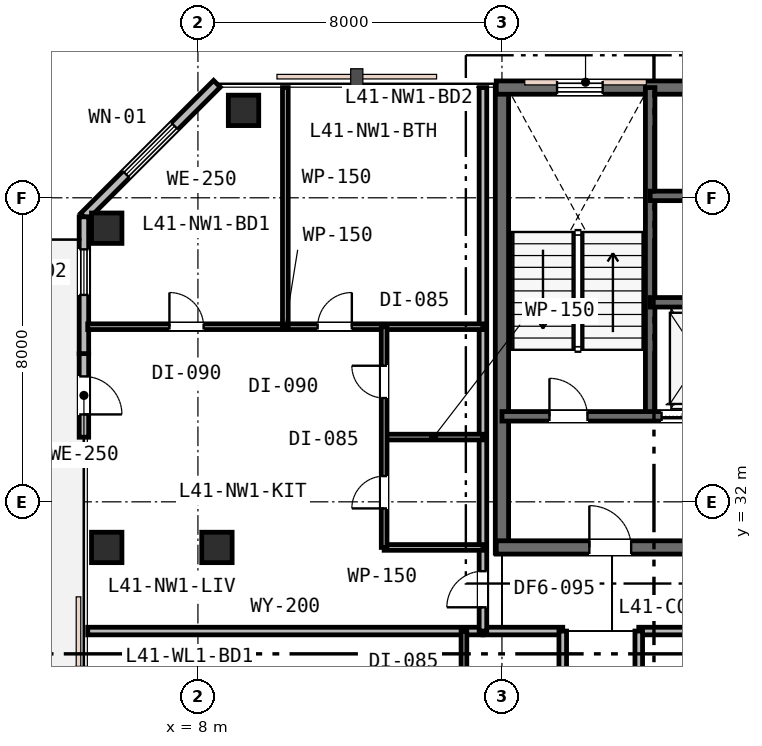
"""IFC4 building model, lengths in metres.
Left out: names, types, materials, properties, quantities, classifications, styles, units other than length and angle.
Written with IfcOpenShell. Run it as: python <this file> out.ifc"""

import sys

from ifc_helpers import new_model, si_unit, direction, frame, frame_2d, origin, origin_2d, place, context, subcontext, project, spatial, rectangle, extrude, element, fill, save


model = new_model("IFC4")
c1 = context("Model", 3, precision=1e-05, world=origin(), true_north=direction((0.0, 1.0)))
c2 = subcontext(c1, "Body", "Model", "MODEL_VIEW")
j1 = project(units=[si_unit("LENGTHUNIT", "METRE"), si_unit("PLANEANGLEUNIT", "RADIAN")], contexts=[c1])
p1 = place(None, origin())
s1 = spatial("IfcSite", under=j1, at=p1, CompositionType="ELEMENT")
p2 = place(p1, origin())
s2 = spatial("IfcBuilding", under=s1, at=p2, CompositionType="ELEMENT")
p3 = place(p2, frame((0.0, 0.0, 161.4)))
s3 = spatial("IfcBuildingStorey", under=s2, at=p3, CompositionType="ELEMENT", Elevation=161.4)
p4 = place(p3, frame((16.0, 30.65, 0.0), z_axis=(0.0, 0.0, 1.0), x_axis=(0.0, 1.0, 0.0)))
e1 = element("IfcWall", 1, at=p4, inside=s3, PredefinedType="SHEAR", context=c2, shape_type="SweptSolid", body=[
    extrude(rectangle(XDim=12.3, YDim=0.35, at=frame_2d((6.15, 0.0))), origin(), (0.0, 0.0, 1.0), 3.6),
])
p5 = place(p3, frame((15.85, 42.9, 0.0), z_axis=(0.0, 0.0, 1.0), x_axis=(1.0, 0.0, 0.0)))
e2 = element("IfcWall", 2, at=p5, inside=s3, PredefinedType="SHEAR", context=c2, shape_type="SweptSolid", body=[
    extrude(rectangle(XDim=24.3, YDim=0.35, at=frame_2d((12.15, 0.0))), origin(), (0.0, 0.0, 1.0), 3.6),
])
p6 = place(p5, frame((1.6, 0.0, 0.95)))
e3 = element("IfcOpeningElement", 3, at=p6, cuts=e2, PredefinedType="OPENING", context=c2, shape_type="SweptSolid", body=[
    extrude(rectangle(XDim=1.2, YDim=1.6, at=frame_2d((0.6, 0.8))), frame((0.0, 0.185, 0.0), z_axis=(0.0, -1.0, 0.0), x_axis=(1.0, 0.0, 0.0)), (0.0, 0.0, 1.0), 0.37),
])
p7 = place(p5, frame((16.5, 0.0, 0.95)))
e4 = element("IfcOpeningElement", 4, at=p7, cuts=e2, PredefinedType="OPENING", context=c2, shape_type="SweptSolid", body=[
    extrude(rectangle(XDim=1.2, YDim=1.6, at=frame_2d((0.6, 0.8))), frame((0.0, 0.185, 0.0), z_axis=(0.0, -1.0, 0.0), x_axis=(1.0, 0.0, 0.0)), (0.0, 0.0, 1.0), 0.37),
])
p8 = place(p5, frame((21.6, 0.0, 0.95)))
e5 = element("IfcOpeningElement", 5, at=p8, cuts=e2, PredefinedType="OPENING", context=c2, shape_type="SweptSolid", body=[
    extrude(rectangle(XDim=1.2, YDim=1.6, at=frame_2d((0.6, 0.8))), frame((0.0, 0.185, 0.0), z_axis=(0.0, -1.0, 0.0), x_axis=(1.0, 0.0, 0.0)), (0.0, 0.0, 1.0), 0.37),
])
p9 = place(p3, frame((15.85, 30.8, 0.0), z_axis=(0.0, 0.0, 1.0), x_axis=(1.0, 0.0, 0.0)))
e6 = element("IfcWall", 6, at=p9, inside=s3, PredefinedType="SHEAR", context=c2, shape_type="SweptSolid", body=[
    extrude(rectangle(XDim=11.2, YDim=0.35, at=frame_2d((5.6, 0.0))), origin(), (0.0, 0.0, 1.0), 3.6),
])
p10 = place(p9, frame((2.45, 0.0, 0.0)))
e7 = element("IfcOpeningElement", 7, at=p10, cuts=e6, PredefinedType="OPENING", context=c2, shape_type="SweptSolid", body=[
    extrude(rectangle(XDim=1.1, YDim=2.15, at=frame_2d((0.55, 1.075))), frame((0.0, 0.185, 0.0), z_axis=(0.0, -1.0, 0.0), x_axis=(1.0, 0.0, 0.0)), (0.0, 0.0, 1.0), 0.37),
])
p11 = place(p3, frame((19.9, 34.25, 0.0), z_axis=(0.0, 0.0, 1.0), x_axis=(0.0, 1.0, 0.0)))
e8 = element("IfcWall", 8, at=p11, inside=s3, PredefinedType="SHEAR", context=c2, shape_type="SweptSolid", body=[
    extrude(rectangle(XDim=8.65, YDim=0.25, at=frame_2d((4.325, 0.0))), origin(), (0.0, 0.0, 1.0), 3.6),
])
p12 = place(p3, frame((16.0, 34.25, 0.0), z_axis=(0.0, 0.0, 1.0), x_axis=(1.0, 0.0, 0.0)))
e9 = element("IfcWall", 9, at=p12, inside=s3, PredefinedType="SHEAR", context=c2, shape_type="SweptSolid", body=[
    extrude(rectangle(XDim=6.05, YDim=0.25, at=frame_2d((3.025, 0.0))), origin(), (0.0, 0.0, 1.0), 3.6),
])
p13 = place(p12, frame((1.25, 0.0, 0.0)))
e10 = element("IfcOpeningElement", 10, at=p13, cuts=e9, PredefinedType="OPENING", context=c2, shape_type="SweptSolid", body=[
    extrude(rectangle(XDim=1.0, YDim=2.15, at=frame_2d((0.5, 1.075))), frame((0.0, 0.135, 0.0), z_axis=(0.0, -1.0, 0.0), x_axis=(1.0, 0.0, 0.0)), (0.0, 0.0, 1.0), 0.27),
])
p14 = place(p12, frame((4.2, 0.0, 0.0)))
e11 = element("IfcOpeningElement", 11, at=p14, cuts=e9, PredefinedType="OPENING", context=c2, shape_type="SweptSolid", body=[
    extrude(rectangle(XDim=1.1, YDim=2.15, at=frame_2d((0.55, 1.075))), frame((0.0, 0.135, 0.0), z_axis=(0.0, -1.0, 0.0), x_axis=(1.0, 0.0, 0.0)), (0.0, 0.0, 1.0), 0.27),
])
p15 = place(p3, frame((19.9, 37.25, 0.0), z_axis=(0.0, 0.0, 1.0), x_axis=(1.0, 0.0, 0.0)))
e12 = element("IfcWall", 12, at=p15, inside=s3, PredefinedType="SHEAR", context=c2, shape_type="SweptSolid", body=[
    extrude(rectangle(XDim=16.2, YDim=0.25, at=frame_2d((8.1, 0.0))), origin(), (0.0, 0.0, 1.0), 3.6),
])
p16 = place(p15, frame((12.55, 0.0, 0.0)))
e13 = element("IfcOpeningElement", 13, at=p16, cuts=e12, PredefinedType="OPENING", context=c2, shape_type="SweptSolid", body=[
    extrude(rectangle(XDim=0.9, YDim=2.15, at=frame_2d((0.45, 1.075))), frame((0.0, 0.135, 0.0), z_axis=(0.0, -1.0, 0.0), x_axis=(1.0, 0.0, 0.0)), (0.0, 0.0, 1.0), 0.27),
])
p17 = place(p15, frame((2.5, 0.0, 0.0)))
e14 = element("IfcOpeningElement", 14, at=p17, cuts=e12, PredefinedType="OPENING", context=c2, shape_type="SweptSolid", body=[
    extrude(rectangle(XDim=1.05, YDim=2.15, at=frame_2d((0.525, 1.075))), frame((0.0, 0.135, 0.0), z_axis=(0.0, -1.0, 0.0), x_axis=(1.0, 0.0, 0.0)), (0.0, 0.0, 1.0), 0.27),
])
p18 = place(p15, frame((4.4, 0.0, 0.0)))
e15 = element("IfcOpeningElement", 15, at=p18, cuts=e12, PredefinedType="OPENING", context=c2, shape_type="SweptSolid", body=[
    extrude(rectangle(XDim=1.05, YDim=2.15, at=frame_2d((0.525, 1.075))), frame((0.0, 0.135, 0.0), z_axis=(0.0, -1.0, 0.0), x_axis=(1.0, 0.0, 0.0)), (0.0, 0.0, 1.0), 0.27),
])
p19 = place(p15, frame((6.3, 0.0, 0.0)))
e16 = element("IfcOpeningElement", 16, at=p19, cuts=e12, PredefinedType="OPENING", context=c2, shape_type="SweptSolid", body=[
    extrude(rectangle(XDim=1.05, YDim=2.15, at=frame_2d((0.525, 1.075))), frame((0.0, 0.135, 0.0), z_axis=(0.0, -1.0, 0.0), x_axis=(1.0, 0.0, 0.0)), (0.0, 0.0, 1.0), 0.27),
])
p20 = place(p3, frame((19.9, 40.05, 0.0), z_axis=(0.0, 0.0, 1.0), x_axis=(1.0, 0.0, 0.0)))
e17 = element("IfcWall", 17, at=p20, inside=s3, PredefinedType="SHEAR", context=c2, shape_type="SweptSolid", body=[
    extrude(rectangle(XDim=12.05, YDim=0.25, at=frame_2d((6.025, 0.0))), origin(), (0.0, 0.0, 1.0), 3.6),
])
for number, where, z_axis, x_axis in (
    (18, (5.6, 30.8, 0.0), (0.0, 0.0, 1.0), (1.0, 0.0, 0.0)),
    (19, (5.6, 39.2, 0.0), (0.0, 0.0, 1.0), (1.0, 0.0, 0.0)),
    (20, (8.5, 30.8, 0.0), (0.0, 0.0, 1.0), (1.0, 0.0, 0.0)),
    (21, (9.2, 42.3, 0.0), (0.0, 0.0, 1.0), (1.0, 0.0, 0.0)),
):
    element("IfcColumn", number, at=place(p3, frame(where, z_axis=z_axis, x_axis=x_axis)), inside=s3, PredefinedType="COLUMN", context=c2, shape_type="SweptSolid", body=[
        extrude(rectangle(XDim=0.8, YDim=0.8, at=origin_2d()), origin(), (0.0, 0.0, 1.0), 3.6),
    ])
p21 = place(p3, frame((8.5, 43.0, 0.0), z_axis=(0.0, 0.0, 1.0), x_axis=(-0.707106781187, -0.707106781187, 0.0)))
e22 = element("IfcWall", 22, at=p21, inside=s3, PredefinedType="STANDARD", context=c2, shape_type="SweptSolid", body=[
    extrude(rectangle(XDim=4.95, YDim=0.25, at=frame_2d((2.475, 0.0))), origin(), (0.0, 0.0, 1.0), 3.33),
])
p22 = place(p21, frame((1.575, 0.0, 0.75)))
e23 = element("IfcOpeningElement", 23, at=p22, cuts=e22, PredefinedType="OPENING", context=c2, shape_type="SweptSolid", body=[
    extrude(rectangle(XDim=1.8, YDim=1.85, at=frame_2d((0.9, 0.925))), frame((0.0, 0.135, 0.0), z_axis=(0.0, -1.0, 0.0), x_axis=(1.0, 0.0, 0.0)), (0.0, 0.0, 1.0), 0.27),
])
p23 = place(p3, frame((5.0, 35.9, 0.0), z_axis=(0.0, 0.0, 1.0), x_axis=(0.0, -1.0, 0.0)))
e24 = element("IfcWall", 24, at=p23, inside=s3, PredefinedType="STANDARD", context=c2, shape_type="SweptSolid", body=[
    extrude(rectangle(XDim=2.2, YDim=0.25, at=frame_2d((1.1, 0.0))), origin(), (0.0, 0.0, 1.0), 3.33),
])
p24 = place(p23, frame((0.6, 0.0, 0.0)))
e25 = element("IfcOpeningElement", 25, at=p24, cuts=e24, PredefinedType="OPENING", context=c2, shape_type="SweptSolid", body=[
    extrude(rectangle(XDim=1.0, YDim=2.15, at=frame_2d((0.5, 1.075))), frame((0.0, 0.135, 0.0), z_axis=(0.0, -1.0, 0.0), x_axis=(1.0, 0.0, 0.0)), (0.0, 0.0, 1.0), 0.27),
])
p25 = place(p3, frame((5.0, 39.5, 0.0), z_axis=(0.0, 0.0, 1.0), x_axis=(0.0, -1.0, 0.0)))
e26 = element("IfcWall", 26, at=p25, inside=s3, PredefinedType="STANDARD", context=c2, shape_type="SweptSolid", body=[
    extrude(rectangle(XDim=3.6, YDim=0.25, at=frame_2d((1.8, 0.0))), origin(), (0.0, 0.0, 1.0), 3.33),
])
p26 = place(p25, frame((0.856, 0.0, 0.85)))
e27 = element("IfcOpeningElement", 27, at=p26, cuts=e26, PredefinedType="OPENING", context=c2, shape_type="SweptSolid", body=[
    extrude(rectangle(XDim=1.2, YDim=1.6, at=frame_2d((0.6, 0.8))), frame((0.0, 0.135, 0.0), z_axis=(0.0, -1.0, 0.0), x_axis=(1.0, 0.0, 0.0)), (0.0, 0.0, 1.0), 0.27),
])
p27 = place(p3, frame((5.1, 28.6, 0.0), z_axis=(0.0, 0.0, 1.0), x_axis=(1.0, 0.0, 0.0)))
e28 = element("IfcWall", 28, at=p27, inside=s3, PredefinedType="PARTITIONING", context=c2, shape_type="SweptSolid", body=[
    extrude(rectangle(XDim=10.4, YDim=0.2, at=frame_2d((5.2, 0.0))), origin(), (0.0, 0.0, 1.0), 2.93),
])
p28 = place(p3, frame((15.5, 28.6, 0.0), z_axis=(0.0, 0.0, 1.0), x_axis=(1.0, 0.0, 0.0)))
e29 = element("IfcWall", 29, at=p28, inside=s3, PredefinedType="PARTITIONING", context=c2, shape_type="SweptSolid", body=[
    extrude(rectangle(XDim=2.1, YDim=0.2, at=frame_2d((1.05, 0.0))), origin(), (0.0, 0.0, 1.0), 2.93),
])
p29 = place(p3, frame((19.6, 28.6, 0.0), z_axis=(0.0, 0.0, 1.0), x_axis=(1.0, 0.0, 0.0)))
e30 = element("IfcWall", 30, at=p29, inside=s3, PredefinedType="PARTITIONING", context=c2, shape_type="SweptSolid", body=[
    extrude(rectangle(XDim=31.3, YDim=0.2, at=frame_2d((15.65, 0.0))), origin(), (0.0, 0.0, 1.0), 2.93),
])
p30 = place(p29, frame((5.445, 0.0, 0.0)))
e31 = element("IfcOpeningElement", 31, at=p30, cuts=e30, PredefinedType="OPENING", context=c2, shape_type="SweptSolid", body=[
    extrude(rectangle(XDim=0.95, YDim=2.15, at=frame_2d((0.475, 1.075))), frame((0.0, 0.11, 0.0), z_axis=(0.0, -1.0, 0.0), x_axis=(1.0, 0.0, 0.0)), (0.0, 0.0, 1.0), 0.22),
])
p31 = place(p29, frame((13.35, 0.0, 0.0)))
e32 = element("IfcOpeningElement", 32, at=p31, cuts=e30, PredefinedType="OPENING", context=c2, shape_type="SweptSolid", body=[
    extrude(rectangle(XDim=0.95, YDim=2.15, at=frame_2d((0.475, 1.075))), frame((0.0, 0.11, 0.0), z_axis=(0.0, -1.0, 0.0), x_axis=(1.0, 0.0, 0.0)), (0.0, 0.0, 1.0), 0.22),
])
p32 = place(p29, frame((21.925, 0.0, 0.0)))
e33 = element("IfcOpeningElement", 33, at=p32, cuts=e30, PredefinedType="OPENING", context=c2, shape_type="SweptSolid", body=[
    extrude(rectangle(XDim=0.95, YDim=2.15, at=frame_2d((0.475, 1.075))), frame((0.0, 0.11, 0.0), z_axis=(0.0, -1.0, 0.0), x_axis=(1.0, 0.0, 0.0)), (0.0, 0.0, 1.0), 0.22),
])
p33 = place(p3, frame((15.5, 28.6, 0.0), z_axis=(0.0, 0.0, 1.0), x_axis=(0.0, 1.0, 0.0)))
e34 = element("IfcWall", 34, at=p33, inside=s3, PredefinedType="PARTITIONING", context=c2, shape_type="SweptSolid", body=[
    extrude(rectangle(XDim=14.3, YDim=0.2, at=frame_2d((7.15, 0.0))), origin(), (0.0, 0.0, 1.0), 2.93),
])
p34 = place(p33, frame((0.625, 0.0, 0.0)))
e35 = element("IfcOpeningElement", 35, at=p34, cuts=e34, PredefinedType="OPENING", context=c2, shape_type="SweptSolid", body=[
    extrude(rectangle(XDim=0.95, YDim=2.15, at=frame_2d((0.475, 1.075))), frame((0.0, 0.11, 0.0), z_axis=(0.0, -1.0, 0.0), x_axis=(1.0, 0.0, 0.0)), (0.0, 0.0, 1.0), 0.22),
])
p35 = place(p3, frame((12.9, 30.8, 0.0), z_axis=(0.0, 0.0, 1.0), x_axis=(1.0, 0.0, 0.0)))
e36 = element("IfcWall", 36, at=p35, inside=s3, PredefinedType="PARTITIONING", context=c2, shape_type="SweptSolid", body=[
    extrude(rectangle(XDim=2.6, YDim=0.15, at=frame_2d((1.3, 0.0))), origin(), (0.0, 0.0, 1.0), 2.93),
])
p36 = place(p3, frame((12.9, 33.704, 0.0), z_axis=(0.0, 0.0, 1.0), x_axis=(1.0, 0.0, 0.0)))
e37 = element("IfcWall", 37, at=p36, inside=s3, PredefinedType="PARTITIONING", context=c2, shape_type="SweptSolid", body=[
    extrude(rectangle(XDim=2.6, YDim=0.15, at=frame_2d((1.3, 0.0))), origin(), (0.0, 0.0, 1.0), 3.33),
])
p37 = place(p3, frame((5.1, 36.608, 0.0), z_axis=(0.0, 0.0, 1.0), x_axis=(1.0, 0.0, 0.0)))
e38 = element("IfcWall", 38, at=p37, inside=s3, PredefinedType="PARTITIONING", context=c2, shape_type="SweptSolid", body=[
    extrude(rectangle(XDim=10.4, YDim=0.15, at=frame_2d((5.2, 0.0))), origin(), (0.0, 0.0, 1.0), 3.01),
])
p38 = place(p37, frame((2.15, 0.0, 0.0)))
e39 = element("IfcOpeningElement", 39, at=p38, cuts=e38, PredefinedType="OPENING", context=c2, shape_type="SweptSolid", body=[
    extrude(rectangle(XDim=0.9, YDim=2.15, at=frame_2d((0.45, 1.075))), frame((0.0, 0.085, 0.0), z_axis=(0.0, -1.0, 0.0), x_axis=(1.0, 0.0, 0.0)), (0.0, 0.0, 1.0), 0.17),
])
p39 = place(p37, frame((6.05, 0.0, 0.0)))
e40 = element("IfcOpeningElement", 40, at=p39, cuts=e38, PredefinedType="OPENING", context=c2, shape_type="SweptSolid", body=[
    extrude(rectangle(XDim=0.9, YDim=2.15, at=frame_2d((0.45, 1.075))), frame((0.0, 0.085, 0.0), z_axis=(0.0, -1.0, 0.0), x_axis=(1.0, 0.0, 0.0)), (0.0, 0.0, 1.0), 0.17),
])
p40 = place(p3, frame((12.9, 30.8, 0.0), z_axis=(0.0, 0.0, 1.0), x_axis=(0.0, 1.0, 0.0)))
e41 = element("IfcWall", 41, at=p40, inside=s3, PredefinedType="PARTITIONING", context=c2, shape_type="SweptSolid", body=[
    extrude(rectangle(XDim=5.808, YDim=0.15, at=frame_2d((2.904, 0.0))), origin(), (0.0, 0.0, 1.0), 2.93),
])
p41 = place(p40, frame((1.027, 0.0, 0.0)))
e42 = element("IfcOpeningElement", 42, at=p41, cuts=e41, PredefinedType="OPENING", context=c2, shape_type="SweptSolid", body=[
    extrude(rectangle(XDim=0.85, YDim=2.15, at=frame_2d((0.425, 1.075))), frame((0.0, 0.085, 0.0), z_axis=(0.0, -1.0, 0.0), x_axis=(1.0, 0.0, 0.0)), (0.0, 0.0, 1.0), 0.17),
])
p42 = place(p40, frame((3.931, 0.0, 0.0)))
e43 = element("IfcOpeningElement", 43, at=p42, cuts=e41, PredefinedType="OPENING", context=c2, shape_type="SweptSolid", body=[
    extrude(rectangle(XDim=0.85, YDim=2.15, at=frame_2d((0.425, 1.075))), frame((0.0, 0.085, 0.0), z_axis=(0.0, -1.0, 0.0), x_axis=(1.0, 0.0, 0.0)), (0.0, 0.0, 1.0), 0.17),
])
p43 = place(p3, frame((10.3, 36.608, 0.0), z_axis=(0.0, 0.0, 1.0), x_axis=(0.0, 1.0, 0.0)))
e44 = element("IfcWall", 44, at=p43, inside=s3, PredefinedType="PARTITIONING", context=c2, shape_type="SweptSolid", body=[
    extrude(rectangle(XDim=6.292, YDim=0.15, at=frame_2d((3.146, 0.0))), origin(), (0.0, 0.0, 1.0), 3.33),
])
p44 = place(p3, frame((17.6, 17.0, 0.0), z_axis=(0.0, 0.0, 1.0), x_axis=(0.0, 1.0, 0.0)))
e45 = element("IfcWall", 45, at=p44, inside=s3, PredefinedType="PARTITIONING", context=c2, shape_type="SweptSolid", body=[
    extrude(rectangle(XDim=11.6, YDim=0.2, at=frame_2d((5.8, 0.0))), origin(), (0.0, 0.0, 1.0), 2.93),
])
p45 = place(p44, frame((0.723, 0.0, 0.0)))
e46 = element("IfcOpeningElement", 46, at=p45, cuts=e45, PredefinedType="OPENING", context=c2, shape_type="SweptSolid", body=[
    extrude(rectangle(XDim=0.95, YDim=2.15, at=frame_2d((0.475, 1.075))), frame((0.0, 0.11, 0.0), z_axis=(0.0, -1.0, 0.0), x_axis=(1.0, 0.0, 0.0)), (0.0, 0.0, 1.0), 0.22),
])
p46 = place(p3, frame((15.0, 19.396, 0.0), z_axis=(0.0, 0.0, 1.0), x_axis=(0.0, 1.0, 0.0)))
e47 = element("IfcWall", 47, at=p46, inside=s3, PredefinedType="PARTITIONING", context=c2, shape_type="SweptSolid", body=[
    extrude(rectangle(XDim=9.204, YDim=0.15, at=frame_2d((4.602, 0.0))), origin(), (0.0, 0.0, 1.0), 2.93),
])
p47 = place(p46, frame((0.6, 0.0, 0.0)))
e48 = element("IfcOpeningElement", 48, at=p47, cuts=e47, PredefinedType="OPENING", context=c2, shape_type="SweptSolid", body=[
    extrude(rectangle(XDim=0.85, YDim=2.15, at=frame_2d((0.425, 1.075))), frame((0.0, 0.085, 0.0), z_axis=(0.0, -1.0, 0.0), x_axis=(1.0, 0.0, 0.0)), (0.0, 0.0, 1.0), 0.17),
])
p48 = place(p46, frame((2.65, 0.0, 0.0)))
e49 = element("IfcOpeningElement", 49, at=p48, cuts=e47, PredefinedType="OPENING", context=c2, shape_type="SweptSolid", body=[
    extrude(rectangle(XDim=0.85, YDim=2.15, at=frame_2d((0.425, 1.075))), frame((0.0, 0.085, 0.0), z_axis=(0.0, -1.0, 0.0), x_axis=(1.0, 0.0, 0.0)), (0.0, 0.0, 1.0), 0.17),
])
p49 = place(p46, frame((6.593, 0.0, 0.0)))
e50 = element("IfcOpeningElement", 50, at=p49, cuts=e47, PredefinedType="OPENING", context=c2, shape_type="SweptSolid", body=[
    extrude(rectangle(XDim=0.85, YDim=2.15, at=frame_2d((0.425, 1.075))), frame((0.0, 0.085, 0.0), z_axis=(0.0, -1.0, 0.0), x_axis=(1.0, 0.0, 0.0)), (0.0, 0.0, 1.0), 0.17),
])
p50 = place(p3, frame((19.6, 17.0, 0.0), z_axis=(0.0, 0.0, 1.0), x_axis=(0.0, 1.0, 0.0)))
e51 = element("IfcWall", 51, at=p50, inside=s3, PredefinedType="PARTITIONING", context=c2, shape_type="SweptSolid", body=[
    extrude(rectangle(XDim=11.6, YDim=0.2, at=frame_2d((5.8, 0.0))), origin(), (0.0, 0.0, 1.0), 2.93),
])
p51 = place(p50, frame((3.125, 0.0, 0.0)))
e52 = element("IfcOpeningElement", 52, at=p51, cuts=e51, PredefinedType="OPENING", context=c2, shape_type="SweptSolid", body=[
    extrude(rectangle(XDim=0.95, YDim=2.15, at=frame_2d((0.475, 1.075))), frame((0.0, 0.11, 0.0), z_axis=(0.0, -1.0, 0.0), x_axis=(1.0, 0.0, 0.0)), (0.0, 0.0, 1.0), 0.22),
])
p52 = place(p6, origin())
e53 = element("IfcWindow", 53, at=p52, inside=s3, PartitioningType="SINGLE_PANEL", PredefinedType="WINDOW", context=c2, shape_type="SweptSolid", body=[
    extrude(rectangle(XDim=1.2, YDim=1.6, at=frame_2d((0.6, 0.8))), frame((0.0, 0.03, 0.0), z_axis=(0.0, -1.0, 0.0), x_axis=(1.0, 0.0, 0.0)), (0.0, 0.0, 1.0), 0.06),
])
fill(e3, e53)
p53 = place(p22, origin())
e54 = element("IfcWindow", 54, at=p53, inside=s3, PartitioningType="SINGLE_PANEL", PredefinedType="WINDOW", context=c2, shape_type="SweptSolid", body=[
    extrude(rectangle(XDim=1.8, YDim=1.85, at=frame_2d((0.9, 0.925))), frame((0.0, 0.03, 0.0), z_axis=(0.0, -1.0, 0.0), x_axis=(1.0, 0.0, 0.0)), (0.0, 0.0, 1.0), 0.06),
])
fill(e23, e54)
p54 = place(p24, origin())
e55 = element("IfcDoor", 55, at=p54, inside=s3, OperationType="SINGLE_SWING_RIGHT", PredefinedType="DOOR", context=c2, shape_type="SweptSolid", body=[
    extrude(rectangle(XDim=1.0, YDim=2.15, at=frame_2d((0.5, 1.075))), frame((0.0, 0.025, 0.0), z_axis=(0.0, -1.0, 0.0), x_axis=(1.0, 0.0, 0.0)), (0.0, 0.0, 1.0), 0.05),
])
fill(e25, e55)
p55 = place(p26, origin())
e56 = element("IfcWindow", 56, at=p55, inside=s3, PartitioningType="SINGLE_PANEL", PredefinedType="WINDOW", context=c2, shape_type="SweptSolid", body=[
    extrude(rectangle(XDim=1.2, YDim=1.6, at=frame_2d((0.6, 0.8))), frame((0.0, 0.03, 0.0), z_axis=(0.0, -1.0, 0.0), x_axis=(1.0, 0.0, 0.0)), (0.0, 0.0, 1.0), 0.06),
])
fill(e27, e56)
p56 = place(p13, origin())
e57 = element("IfcDoor", 57, at=p56, inside=s3, OperationType="SINGLE_SWING_LEFT", PredefinedType="DOOR", context=c2, shape_type="SweptSolid", body=[
    extrude(rectangle(XDim=1.0, YDim=2.15, at=frame_2d((0.5, 1.075))), frame((0.0, 0.025, 0.0), z_axis=(0.0, -1.0, 0.0), x_axis=(1.0, 0.0, 0.0)), (0.0, 0.0, 1.0), 0.05),
])
fill(e10, e57)
p57 = place(p10, origin())
e58 = element("IfcDoor", 58, at=p57, inside=s3, OperationType="SINGLE_SWING_LEFT", PredefinedType="DOOR", context=c2, shape_type="SweptSolid", body=[
    extrude(rectangle(XDim=1.1, YDim=2.15, at=frame_2d((0.55, 1.075))), frame((0.0, 0.025, 0.0), z_axis=(0.0, -1.0, 0.0), x_axis=(1.0, 0.0, 0.0)), (0.0, 0.0, 1.0), 0.05),
])
fill(e7, e58)
p58 = place(p34, origin())
e59 = element("IfcDoor", 59, at=p58, inside=s3, OperationType="SINGLE_SWING_LEFT", PredefinedType="DOOR", context=c2, shape_type="SweptSolid", body=[
    extrude(rectangle(XDim=0.95, YDim=2.15, at=frame_2d((0.475, 1.075))), frame((0.0, 0.025, 0.0), z_axis=(0.0, -1.0, 0.0), x_axis=(1.0, 0.0, 0.0)), (0.0, 0.0, 1.0), 0.05),
])
fill(e35, e59)
p59 = place(p41, origin())
e60 = element("IfcDoor", 60, at=p59, inside=s3, OperationType="SINGLE_SWING_LEFT", PredefinedType="DOOR", context=c2, shape_type="SweptSolid", body=[
    extrude(rectangle(XDim=0.85, YDim=2.15, at=frame_2d((0.425, 1.075))), frame((0.0, 0.025, 0.0), z_axis=(0.0, -1.0, 0.0), x_axis=(1.0, 0.0, 0.0)), (0.0, 0.0, 1.0), 0.05),
])
fill(e42, e60)
p60 = place(p42, origin())
e61 = element("IfcDoor", 61, at=p60, inside=s3, OperationType="SINGLE_SWING_RIGHT", PredefinedType="DOOR", context=c2, shape_type="SweptSolid", body=[
    extrude(rectangle(XDim=0.85, YDim=2.15, at=frame_2d((0.425, 1.075))), frame((0.0, 0.025, 0.0), z_axis=(0.0, -1.0, 0.0), x_axis=(1.0, 0.0, 0.0)), (0.0, 0.0, 1.0), 0.05),
])
fill(e43, e61)
p61 = place(p38, origin())
e62 = element("IfcDoor", 62, at=p61, inside=s3, OperationType="SINGLE_SWING_LEFT", PredefinedType="DOOR", context=c2, shape_type="SweptSolid", body=[
    extrude(rectangle(XDim=0.9, YDim=2.15, at=frame_2d((0.45, 1.075))), frame((0.0, 0.025, 0.0), z_axis=(0.0, -1.0, 0.0), x_axis=(1.0, 0.0, 0.0)), (0.0, 0.0, 1.0), 0.05),
])
fill(e39, e62)
p62 = place(p39, origin())
e63 = element("IfcDoor", 63, at=p62, inside=s3, OperationType="SINGLE_SWING_RIGHT", PredefinedType="DOOR", context=c2, shape_type="SweptSolid", body=[
    extrude(rectangle(XDim=0.9, YDim=2.15, at=frame_2d((0.45, 1.075))), frame((0.0, 0.025, 0.0), z_axis=(0.0, -1.0, 0.0), x_axis=(1.0, 0.0, 0.0)), (0.0, 0.0, 1.0), 0.05),
])
fill(e40, e63)
p63 = place(p14, origin())
e64 = element("IfcDoor", 64, at=p63, inside=s3, OperationType="DOUBLE_DOOR_SLIDING", PredefinedType="DOOR", context=c2, shape_type="SweptSolid", body=[
    extrude(rectangle(XDim=1.1, YDim=2.15, at=frame_2d((0.55, 1.075))), frame((0.0, 0.025, 0.0), z_axis=(0.0, -1.0, 0.0), x_axis=(1.0, 0.0, 0.0)), (0.0, 0.0, 1.0), 0.05),
])
fill(e11, e64)
save(model, sys.argv[1])
